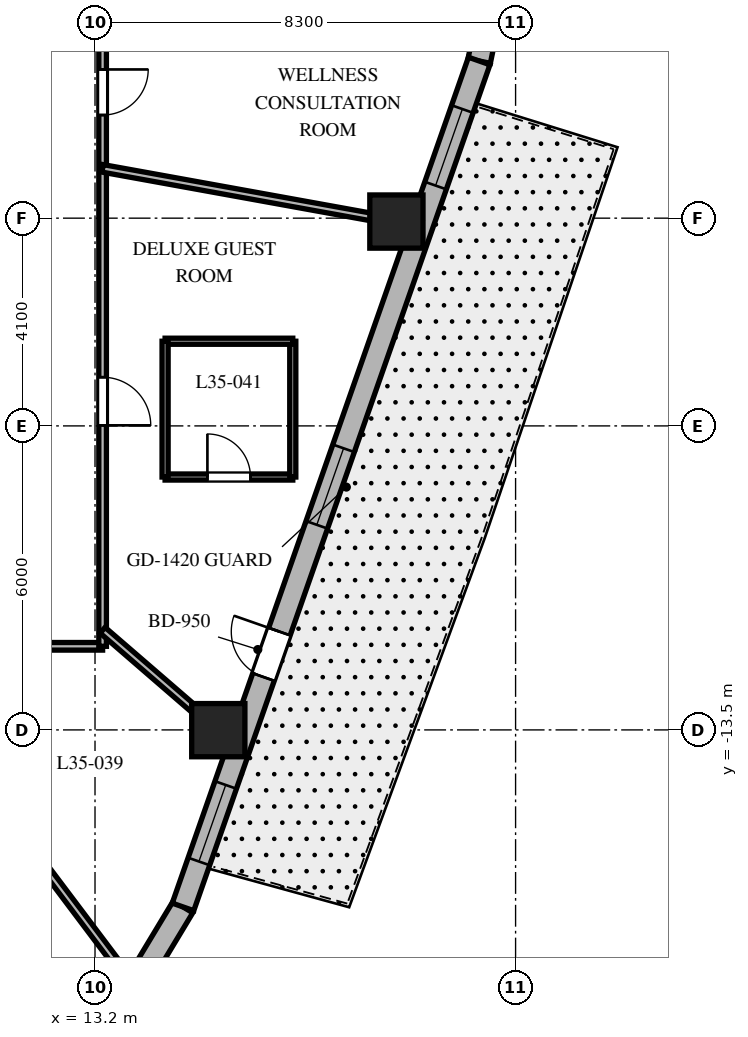
"""IFC4 building model, lengths in metres.
Left out: names, types, materials, properties, quantities, classifications, styles, units other than length and angle.
Written with IfcOpenShell. Run it as: python <this file> out.ifc"""

import sys

from ifc_helpers import new_model, si_unit, direction, frame, frame_2d, origin, origin_2d, place, context, subcontext, project, spatial, rectangle, extrude, element, fill, save


model = new_model("IFC4")
c1 = context("Model", 3, precision=1e-05, world=origin(), true_north=direction((0.0, 1.0)))
c2 = subcontext(c1, "Body", "Model", "MODEL_VIEW")
j1 = project(units=[si_unit("LENGTHUNIT", "METRE"), si_unit("PLANEANGLEUNIT", "RADIAN")], contexts=[c1])
p1 = place(None, origin())
s1 = spatial("IfcSite", under=j1, at=p1, CompositionType="ELEMENT")
p2 = place(p1, origin())
s2 = spatial("IfcBuilding", under=s1, at=p2, CompositionType="ELEMENT")
p3 = place(p2, frame((0.0, 0.0, 144.3)))
s3 = spatial("IfcBuildingStorey", under=s2, at=p3, CompositionType="ELEMENT", Elevation=144.3)
for number, where, z_axis, x_axis in (
    (1, (15.633, -13.505, 0.0), (0.0, 0.0, 1.0), (1.0, 0.0, 0.0)),
    (2, (19.148, -3.467, 0.0), (0.0, 0.0, 1.0), (1.0, 0.0, 0.0)),
):
    element("IfcColumn", number, at=place(p3, frame(where, z_axis=z_axis, x_axis=x_axis)), inside=s3, PredefinedType="COLUMN", context=c2, shape_type="SweptSolid", body=[
        extrude(rectangle(XDim=1.05, YDim=1.05, at=origin_2d()), origin(), (0.0, 0.0, 1.0), 3.7),
    ])
p4 = place(p3, frame((14.214, -18.192, 0.0), z_axis=(0.0, 0.0, 1.0), x_axis=(0.516340945502, 0.856383108193, 0.0)))
e3 = element("IfcWall", 3, at=p4, inside=s3, PredefinedType="SOLIDWALL", context=c2, shape_type="SweptSolid", body=[
    extrude(rectangle(XDim=1.4, YDim=0.45, at=frame_2d((0.7, 0.0))), origin(), (0.0, 0.0, 1.0), 3.4),
])
p5 = place(p3, frame((20.782, -0.298, 0.0), z_axis=(0.0, 0.0, 1.0), x_axis=(0.202570068411, 0.979267771033, 0.0)))
e4 = element("IfcWall", 4, at=p5, inside=s3, PredefinedType="SOLIDWALL", context=c2, shape_type="SweptSolid", body=[
    extrude(rectangle(XDim=0.909, YDim=0.45, at=frame_2d((0.454, 0.0))), origin(), (0.0, 0.0, 1.0), 3.4),
])
p6 = place(p3, frame((14.937, -16.993, 0.0), z_axis=(0.0, 0.0, 1.0), x_axis=(0.330431575061, 0.943829949834, 0.0)))
e5 = element("IfcWall", 5, at=p6, inside=s3, PredefinedType="SOLIDWALL", context=c2, shape_type="SweptSolid", body=[
    extrude(rectangle(XDim=17.689, YDim=0.45, at=frame_2d((8.844, 0.0))), origin(), (0.0, 0.0, 1.0), 3.4),
])
p7 = place(p6, frame((4.807, 0.0, 0.0)))
e6 = element("IfcOpeningElement", 6, at=p7, cuts=e5, PredefinedType="OPENING", context=c2, shape_type="SweptSolid", body=[
    extrude(rectangle(XDim=0.95, YDim=2.15, at=frame_2d((0.475, 1.075))), frame((0.0, 0.235, 0.0), z_axis=(0.0, -1.0, 0.0), x_axis=(1.0, 0.0, 0.0)), (0.0, 0.0, 1.0), 0.47),
])
p8 = place(p6, frame((0.95, 0.0, 0.8)))
e7 = element("IfcOpeningElement", 7, at=p8, cuts=e5, PredefinedType="OPENING", context=c2, shape_type="SweptSolid", body=[
    extrude(rectangle(XDim=1.6, YDim=1.75, at=frame_2d((0.8, 0.875))), frame((0.0, 0.235, 0.0), z_axis=(0.0, -1.0, 0.0), x_axis=(1.0, 0.0, 0.0)), (0.0, 0.0, 1.0), 0.47),
])
p9 = place(p6, frame((7.99, 0.0, 0.8)))
e8 = element("IfcOpeningElement", 8, at=p9, cuts=e5, PredefinedType="OPENING", context=c2, shape_type="SweptSolid", body=[
    extrude(rectangle(XDim=1.6, YDim=1.75, at=frame_2d((0.8, 0.875))), frame((0.0, 0.235, 0.0), z_axis=(0.0, -1.0, 0.0), x_axis=(1.0, 0.0, 0.0)), (0.0, 0.0, 1.0), 0.47),
])
p10 = place(p6, frame((15.084, 0.0, 0.8)))
e9 = element("IfcOpeningElement", 9, at=p10, cuts=e5, PredefinedType="OPENING", context=c2, shape_type="SweptSolid", body=[
    extrude(rectangle(XDim=1.6, YDim=1.75, at=frame_2d((0.8, 0.875))), frame((0.0, 0.235, 0.0), z_axis=(0.0, -1.0, 0.0), x_axis=(1.0, 0.0, 0.0)), (0.0, 0.0, 1.0), 0.47),
])
p11 = place(p3, frame((13.35, -11.85, 0.0), z_axis=(0.0, 0.0, 1.0), x_axis=(-1.0, 0.0, 0.0)))
e10 = element("IfcWall", 10, at=p11, inside=s3, PredefinedType="PARTITIONING", context=c2, shape_type="SweptSolid", body=[
    extrude(rectangle(XDim=26.7, YDim=0.15, at=frame_2d((13.35, 0.0))), origin(), (0.0, 0.0, 1.0), 2.84),
])
p12 = place(p11, frame((22.7, 0.0, 0.0)))
e11 = element("IfcOpeningElement", 11, at=p12, cuts=e10, PredefinedType="OPENING", context=c2, shape_type="SweptSolid", body=[
    extrude(rectangle(XDim=0.9, YDim=2.03, at=frame_2d((0.45, 1.015))), frame((0.0, 0.085, 0.0), z_axis=(0.0, -1.0, 0.0), x_axis=(1.0, 0.0, 0.0)), (0.0, 0.0, 1.0), 0.17),
])
p13 = place(p11, frame((18.523, 0.0, 0.0)))
e12 = element("IfcOpeningElement", 12, at=p13, cuts=e10, PredefinedType="OPENING", context=c2, shape_type="SweptSolid", body=[
    extrude(rectangle(XDim=0.95, YDim=2.03, at=frame_2d((0.475, 1.015))), frame((0.0, 0.085, 0.0), z_axis=(0.0, -1.0, 0.0), x_axis=(1.0, 0.0, 0.0)), (0.0, 0.0, 1.0), 0.17),
])
p14 = place(p11, frame((12.362, 0.0, 0.0)))
e13 = element("IfcOpeningElement", 13, at=p14, cuts=e10, PredefinedType="OPENING", context=c2, shape_type="SweptSolid", body=[
    extrude(rectangle(XDim=0.95, YDim=2.03, at=frame_2d((0.475, 1.015))), frame((0.0, 0.085, 0.0), z_axis=(0.0, -1.0, 0.0), x_axis=(1.0, 0.0, 0.0)), (0.0, 0.0, 1.0), 0.17),
])
p15 = place(p11, frame((6.061, 0.0, 0.0)))
e14 = element("IfcOpeningElement", 14, at=p15, cuts=e10, PredefinedType="OPENING", context=c2, shape_type="SweptSolid", body=[
    extrude(rectangle(XDim=0.95, YDim=2.03, at=frame_2d((0.475, 1.015))), frame((0.0, 0.085, 0.0), z_axis=(0.0, -1.0, 0.0), x_axis=(1.0, 0.0, 0.0)), (0.0, 0.0, 1.0), 0.17),
])
p16 = place(p11, frame((1.886, 0.0, 0.0)))
e15 = element("IfcOpeningElement", 15, at=p16, cuts=e10, PredefinedType="OPENING", context=c2, shape_type="SweptSolid", body=[
    extrude(rectangle(XDim=0.9, YDim=2.03, at=frame_2d((0.45, 1.015))), frame((0.0, 0.085, 0.0), z_axis=(0.0, -1.0, 0.0), x_axis=(1.0, 0.0, 0.0)), (0.0, 0.0, 1.0), 0.17),
])
p17 = place(p3, frame((13.35, 11.85, 0.0), z_axis=(0.0, 0.0, 1.0), x_axis=(0.0, -1.0, 0.0)))
e16 = element("IfcWall", 16, at=p17, inside=s3, PredefinedType="PARTITIONING", context=c2, shape_type="SweptSolid", body=[
    extrude(rectangle(XDim=23.7, YDim=0.15, at=frame_2d((11.85, 0.0))), origin(), (0.0, 0.0, 1.0), 2.84),
])
p18 = place(p17, frame((9.27, 0.0, 0.0)))
e17 = element("IfcOpeningElement", 17, at=p18, cuts=e16, PredefinedType="OPENING", context=c2, shape_type="SweptSolid", body=[
    extrude(rectangle(XDim=0.9, YDim=2.03, at=frame_2d((0.45, 1.015))), frame((0.0, 0.085, 0.0), z_axis=(0.0, -1.0, 0.0), x_axis=(1.0, 0.0, 0.0)), (0.0, 0.0, 1.0), 0.17),
])
p19 = place(p17, frame((5.393, 0.0, 0.0)))
e18 = element("IfcOpeningElement", 18, at=p19, cuts=e16, PredefinedType="OPENING", context=c2, shape_type="SweptSolid", body=[
    extrude(rectangle(XDim=0.9, YDim=2.03, at=frame_2d((0.45, 1.015))), frame((0.0, 0.085, 0.0), z_axis=(0.0, -1.0, 0.0), x_axis=(1.0, 0.0, 0.0)), (0.0, 0.0, 1.0), 0.17),
])
p20 = place(p17, frame((1.439, 0.0, 0.0)))
e19 = element("IfcOpeningElement", 19, at=p20, cuts=e16, PredefinedType="OPENING", context=c2, shape_type="SweptSolid", body=[
    extrude(rectangle(XDim=0.9, YDim=2.03, at=frame_2d((0.45, 1.015))), frame((0.0, 0.085, 0.0), z_axis=(0.0, -1.0, 0.0), x_axis=(1.0, 0.0, 0.0)), (0.0, 0.0, 1.0), 0.17),
])
p21 = place(p17, frame((18.389, 0.0, 0.0)))
e20 = element("IfcOpeningElement", 20, at=p21, cuts=e16, PredefinedType="OPENING", context=c2, shape_type="SweptSolid", body=[
    extrude(rectangle(XDim=0.95, YDim=2.03, at=frame_2d((0.475, 1.015))), frame((0.0, 0.085, 0.0), z_axis=(0.0, -1.0, 0.0), x_axis=(1.0, 0.0, 0.0)), (0.0, 0.0, 1.0), 0.17),
])
p22 = place(p17, frame((12.315, 0.0, 0.0)))
e21 = element("IfcOpeningElement", 21, at=p22, cuts=e16, PredefinedType="OPENING", context=c2, shape_type="SweptSolid", body=[
    extrude(rectangle(XDim=0.9, YDim=2.03, at=frame_2d((0.45, 1.015))), frame((0.0, 0.085, 0.0), z_axis=(0.0, -1.0, 0.0), x_axis=(1.0, 0.0, 0.0)), (0.0, 0.0, 1.0), 0.17),
])
p23 = place(p3, frame((8.918, -11.85, 0.0), z_axis=(0.0, 0.0, 1.0), x_axis=(0.601347965064, -0.798987249531, 0.0)))
e22 = element("IfcWall", 22, at=p23, inside=s3, PredefinedType="PARTITIONING", context=c2, shape_type="SweptSolid", body=[
    extrude(rectangle(XDim=8.08, YDim=0.15, at=frame_2d((4.04, 0.0))), origin(), (0.0, 0.0, 1.0), 2.64),
])
p24 = place(p3, frame((13.35, -11.533, 0.0), z_axis=(0.0, 0.0, 1.0), x_axis=(0.756711647314, -0.65374879183, 0.0)))
e23 = element("IfcWall", 23, at=p24, inside=s3, PredefinedType="PARTITIONING", context=c2, shape_type="SweptSolid", body=[
    extrude(rectangle(XDim=3.55, YDim=0.15, at=frame_2d((1.775, 0.0))), origin(), (0.0, 0.0, 1.0), 2.64),
])
p25 = place(p3, frame((13.35, -2.417, 0.0), z_axis=(0.0, 0.0, 1.0), x_axis=(0.98399796473, -0.178179699761, 0.0)))
e24 = element("IfcWall", 24, at=p25, inside=s3, PredefinedType="PARTITIONING", context=c2, shape_type="SweptSolid", body=[
    extrude(rectangle(XDim=6.393, YDim=0.15, at=frame_2d((3.197, 0.0))), origin(), (0.0, 0.0, 1.0), 2.64),
])
p26 = place(p3, frame((14.583, -8.509, 0.0), z_axis=(0.0, 0.0, 1.0), x_axis=(1.0, 0.0, 0.0)))
e25 = element("IfcWall", 25, at=p26, inside=s3, PredefinedType="PARTITIONING", context=c2, shape_type="SweptSolid", body=[
    extrude(rectangle(XDim=2.52, YDim=0.12, at=frame_2d((1.26, 0.0))), origin(), (0.0, 0.0, 1.0), 2.972),
])
p27 = place(p26, frame((0.835, 0.0, 0.0)))
e26 = element("IfcOpeningElement", 26, at=p27, cuts=e25, PredefinedType="OPENING", context=c2, shape_type="SweptSolid", body=[
    extrude(rectangle(XDim=0.85, YDim=2.03, at=frame_2d((0.425, 1.015))), frame((0.0, 0.07, 0.0), z_axis=(0.0, -1.0, 0.0), x_axis=(1.0, 0.0, 0.0)), (0.0, 0.0, 1.0), 0.14),
])
p28 = place(p3, frame((17.103, -8.509, 0.0), z_axis=(0.0, 0.0, 1.0), x_axis=(0.0, 1.0, 0.0)))
e27 = element("IfcWall", 27, at=p28, inside=s3, PredefinedType="PARTITIONING", context=c2, shape_type="SweptSolid", body=[
    extrude(rectangle(XDim=2.68, YDim=0.12, at=frame_2d((1.34, 0.0))), origin(), (0.0, 0.0, 1.0), 2.64),
])
p29 = place(p3, frame((17.103, -5.829, 0.0), z_axis=(0.0, 0.0, 1.0), x_axis=(-1.0, 0.0, 0.0)))
e28 = element("IfcWall", 28, at=p29, inside=s3, PredefinedType="PARTITIONING", context=c2, shape_type="SweptSolid", body=[
    extrude(rectangle(XDim=2.52, YDim=0.12, at=frame_2d((1.26, 0.0))), origin(), (0.0, 0.0, 1.0), 2.972),
])
p30 = place(p3, frame((14.583, -5.829, 0.0), z_axis=(0.0, 0.0, 1.0), x_axis=(0.0, -1.0, 0.0)))
e29 = element("IfcWall", 29, at=p30, inside=s3, PredefinedType="PARTITIONING", context=c2, shape_type="SweptSolid", body=[
    extrude(rectangle(XDim=2.68, YDim=0.12, at=frame_2d((1.34, 0.0))), origin(), (0.0, 0.0, 1.0), 2.972),
])
p31 = place(p7, origin())
e30 = element("IfcDoor", 30, at=p31, inside=s3, OperationType="SINGLE_SWING_RIGHT", PredefinedType="DOOR", context=c2, shape_type="SweptSolid", body=[
    extrude(rectangle(XDim=0.95, YDim=2.15, at=frame_2d((0.475, 1.075))), frame((0.0, 0.025, 0.0), z_axis=(0.0, -1.0, 0.0), x_axis=(1.0, 0.0, 0.0)), (0.0, 0.0, 1.0), 0.05),
])
fill(e6, e30)
p32 = place(p8, origin())
e31 = element("IfcWindow", 31, at=p32, inside=s3, PartitioningType="SINGLE_PANEL", PredefinedType="WINDOW", context=c2, shape_type="SweptSolid", body=[
    extrude(rectangle(XDim=1.6, YDim=1.75, at=frame_2d((0.8, 0.875))), frame((0.0, 0.03, 0.0), z_axis=(0.0, -1.0, 0.0), x_axis=(1.0, 0.0, 0.0)), (0.0, 0.0, 1.0), 0.06),
])
fill(e7, e31)
p33 = place(p9, origin())
e32 = element("IfcWindow", 32, at=p33, inside=s3, PartitioningType="SINGLE_PANEL", PredefinedType="WINDOW", context=c2, shape_type="SweptSolid", body=[
    extrude(rectangle(XDim=1.6, YDim=1.75, at=frame_2d((0.8, 0.875))), frame((0.0, 0.03, 0.0), z_axis=(0.0, -1.0, 0.0), x_axis=(1.0, 0.0, 0.0)), (0.0, 0.0, 1.0), 0.06),
])
fill(e8, e32)
p34 = place(p10, origin())
e33 = element("IfcWindow", 33, at=p34, inside=s3, PartitioningType="SINGLE_PANEL", PredefinedType="WINDOW", context=c2, shape_type="SweptSolid", body=[
    extrude(rectangle(XDim=1.6, YDim=1.75, at=frame_2d((0.8, 0.875))), frame((0.0, 0.03, 0.0), z_axis=(0.0, -1.0, 0.0), x_axis=(1.0, 0.0, 0.0)), (0.0, 0.0, 1.0), 0.06),
])
fill(e9, e33)
p35 = place(p21, origin())
e34 = element("IfcDoor", 34, at=p35, inside=s3, OperationType="SINGLE_SWING_RIGHT", PredefinedType="DOOR", context=c2, shape_type="SweptSolid", body=[
    extrude(rectangle(XDim=0.95, YDim=2.03, at=frame_2d((0.475, 1.015))), frame((0.0, 0.025, 0.0), z_axis=(0.0, -1.0, 0.0), x_axis=(1.0, 0.0, 0.0)), (0.0, 0.0, 1.0), 0.05),
])
fill(e20, e34)
p36 = place(p27, origin())
e35 = element("IfcDoor", 35, at=p36, inside=s3, OperationType="SINGLE_SWING_LEFT", PredefinedType="DOOR", context=c2, shape_type="SweptSolid", body=[
    extrude(rectangle(XDim=0.85, YDim=2.03, at=frame_2d((0.425, 1.015))), frame((0.0, 0.025, 0.0), z_axis=(0.0, -1.0, 0.0), x_axis=(1.0, 0.0, 0.0)), (0.0, 0.0, 1.0), 0.05),
])
fill(e26, e35)
p37 = place(p22, origin())
e36 = element("IfcDoor", 36, at=p37, inside=s3, OperationType="SINGLE_SWING_LEFT", PredefinedType="DOOR", context=c2, shape_type="SweptSolid", body=[
    extrude(rectangle(XDim=0.9, YDim=2.03, at=frame_2d((0.45, 1.015))), frame((0.0, 0.025, 0.0), z_axis=(0.0, -1.0, 0.0), x_axis=(1.0, 0.0, 0.0)), (0.0, 0.0, 1.0), 0.05),
])
fill(e21, e36)
save(model, sys.argv[1])
